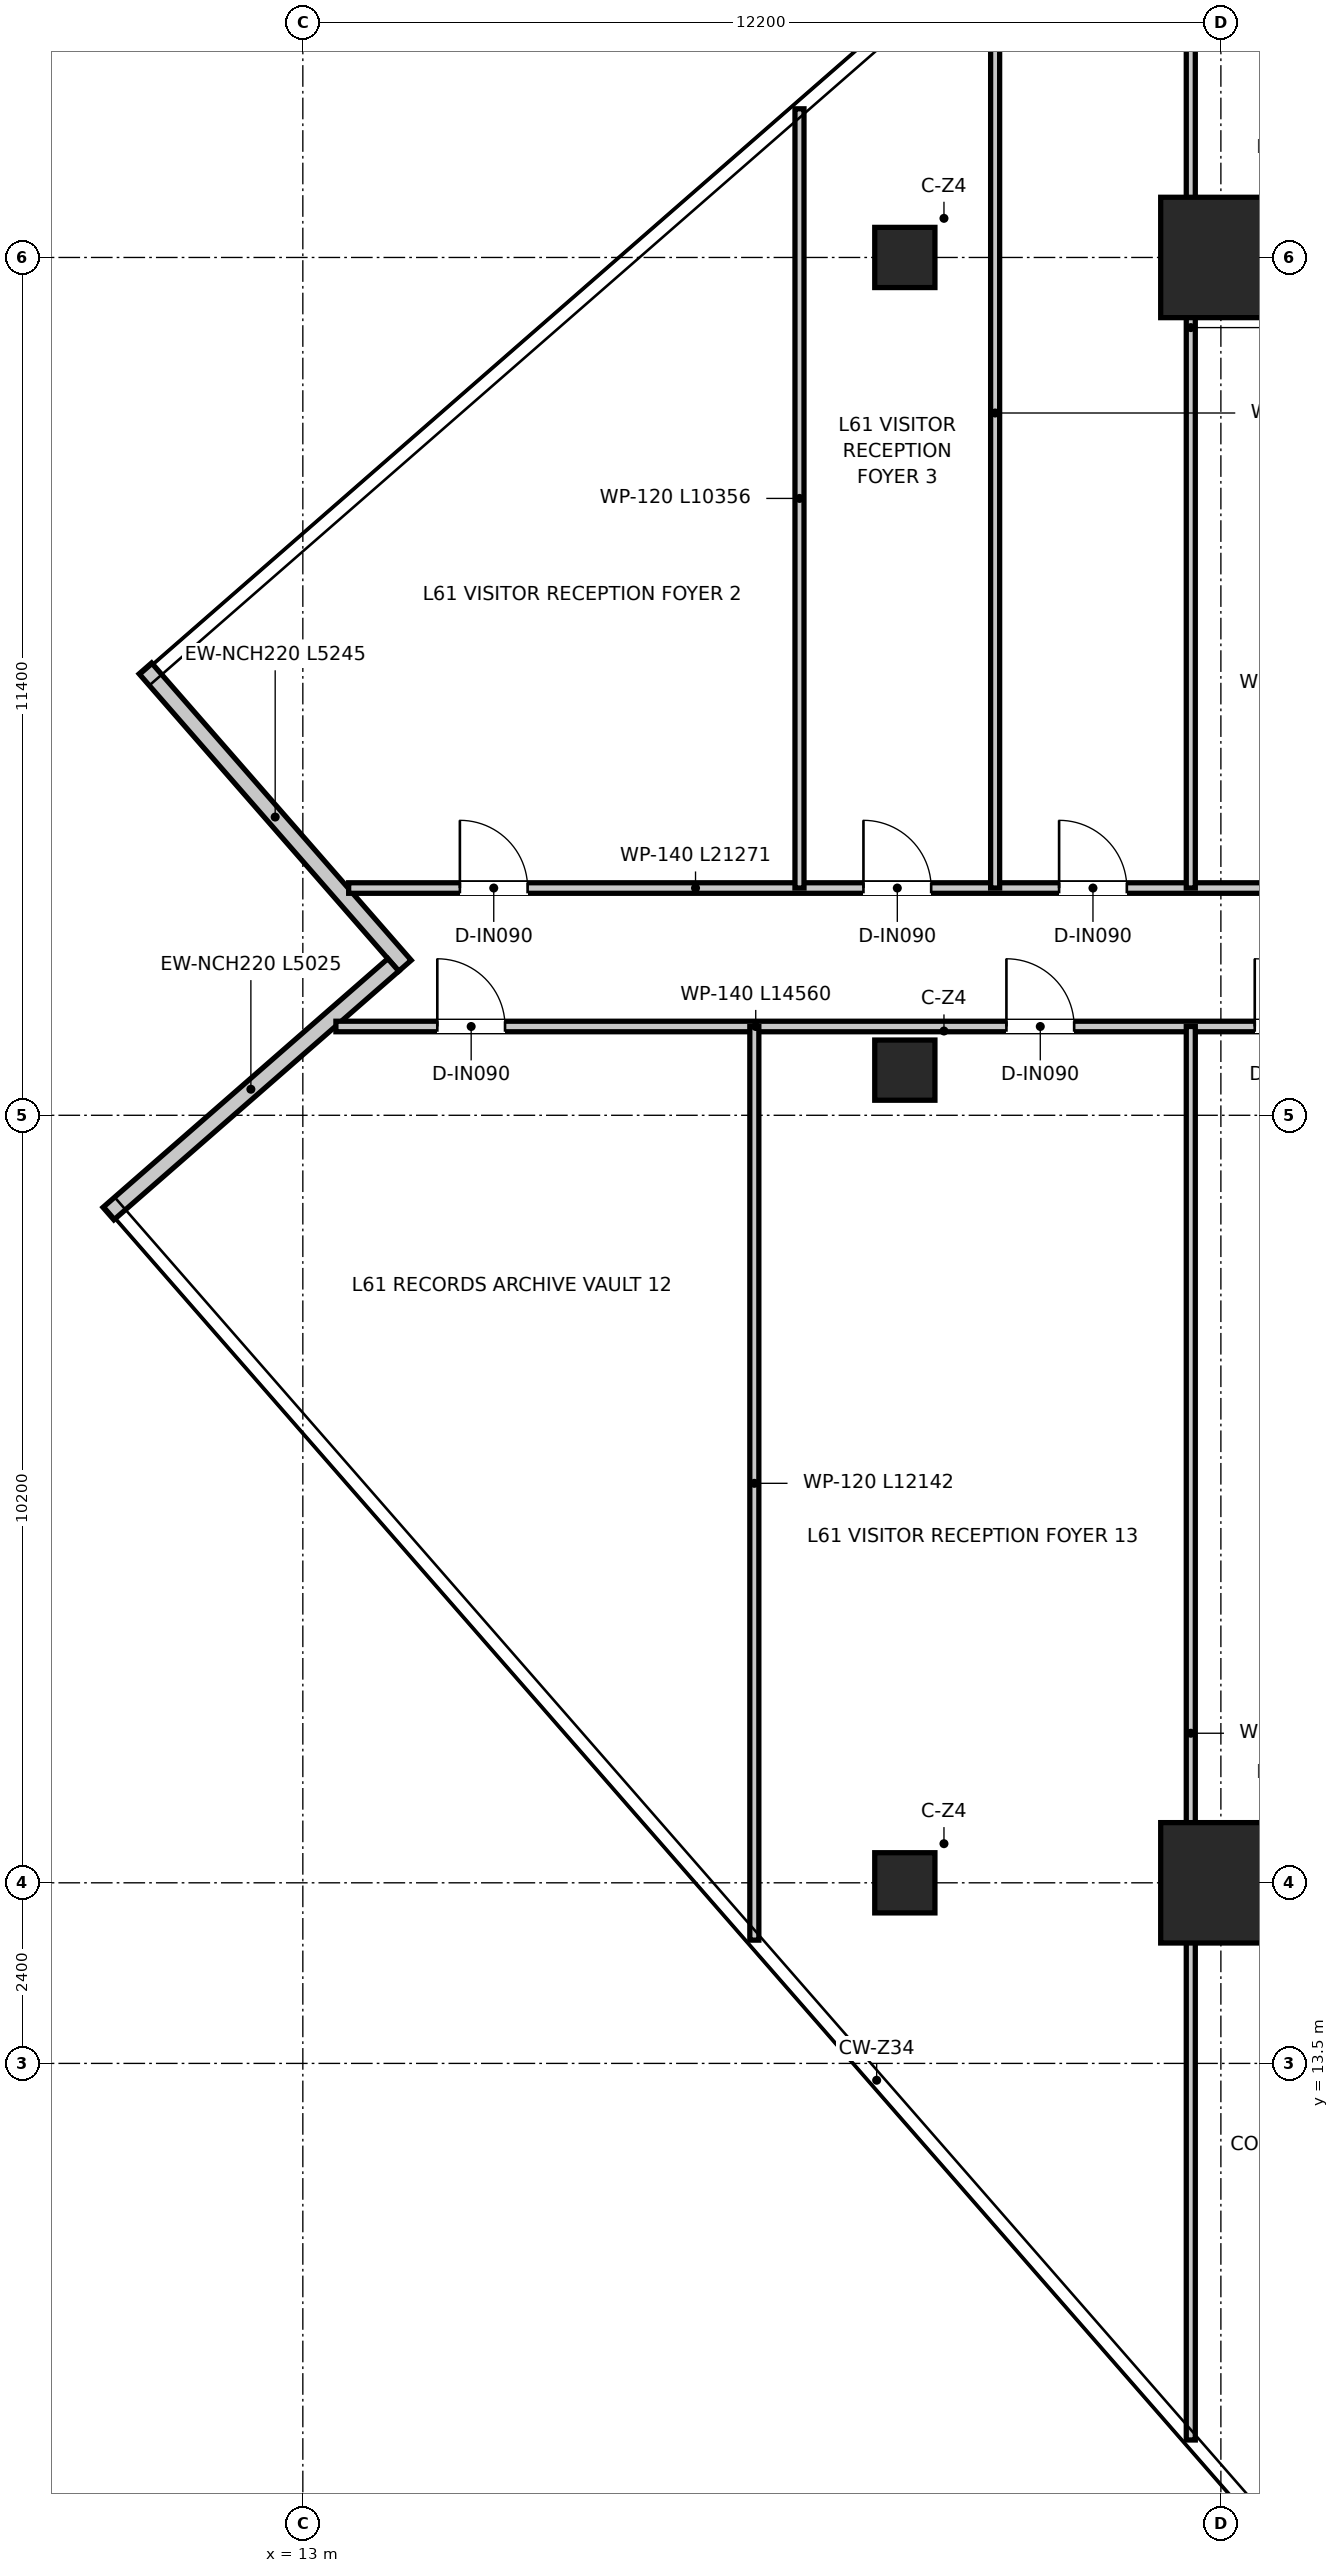
"""IFC4 building model, lengths in metres.
Left out: names, types, materials, properties, quantities, classifications, styles, units other than length and angle.
Written with IfcOpenShell. Run it as: python <this file> out.ifc"""

import sys

from ifc_helpers import new_model, si_unit, direction, frame, frame_2d, origin, origin_2d, place, context, subcontext, project, spatial, rectangle, extrude, source, transform, mapped, element, fill, save


model = new_model("IFC4")
c1 = context("Model", 3, precision=1e-05, world=origin(), true_north=direction((0.0, 1.0)))
c2 = subcontext(c1, "Body", "Model", "MODEL_VIEW")
j1 = project(units=[si_unit("LENGTHUNIT", "METRE"), si_unit("PLANEANGLEUNIT", "RADIAN")], contexts=[c1])
p1 = place(None, origin())
s1 = spatial("IfcSite", under=j1, at=p1, CompositionType="ELEMENT")
p2 = place(p1, origin())
s2 = spatial("IfcBuilding", under=s1, at=p2, CompositionType="ELEMENT")
p3 = place(p2, frame((0.0, 0.0, 250.75)))
s3 = spatial("IfcBuildingStorey", under=s2, at=p3, CompositionType="ELEMENT", Elevation=250.75)
m1 = source(origin(), c2, "Body", "SweptSolid", [
    extrude(rectangle(XDim=1.6, YDim=1.6, at=origin_2d()), origin(), (0.0, 0.0, 1.0), 3.95),
])
for number, where, z_axis, x_axis in (
    (1, (25.2, 15.9, 0.0), (0.0, 0.0, 1.0), (1.0, 0.0, 0.0)),
    (2, (25.2, 37.5, 0.0), (0.0, 0.0, 1.0), (1.0, 0.0, 0.0)),
):
    element("IfcColumn", number, at=place(p3, frame(where, z_axis=z_axis, x_axis=x_axis)), inside=s3, PredefinedType="USERDEFINED", context=c2, shape_type="MappedRepresentation", body=[
        mapped(m1, transform((0.0, 0.0, 0.0), x_axis=(1.0, 0.0, 0.0), y_axis=(0.0, 1.0, 0.0), z_axis=(0.0, 0.0, 1.0), scale=1.0)),
    ])
m2 = source(origin(), c2, "Body", "SweptSolid", [
    extrude(rectangle(XDim=0.8, YDim=0.8, at=origin_2d()), origin(), (0.0, 0.0, 1.0), 3.95),
])
for number, where, z_axis, x_axis in (
    (3, (21.0, 15.9, 0.0), (0.0, 0.0, 1.0), (1.0, 0.0, 0.0)),
    (4, (21.0, 26.7, 0.0), (0.0, 0.0, 1.0), (1.0, 0.0, 0.0)),
    (5, (21.0, 37.5, 0.0), (0.0, 0.0, 1.0), (1.0, 0.0, 0.0)),
):
    element("IfcColumn", number, at=place(p3, frame(where, z_axis=z_axis, x_axis=x_axis)), inside=s3, PredefinedType="COLUMN", context=c2, shape_type="MappedRepresentation", body=[
        mapped(m2, transform((0.0, 0.0, 0.0), x_axis=(1.0, 0.0, 0.0), y_axis=(0.0, 1.0, 0.0), z_axis=(0.0, 0.0, 1.0), scale=1.0)),
    ])
p4 = place(p3, frame((10.908, 32.039, 0.0), z_axis=(0.0, 0.0, 1.0), x_axis=(0.657710057617, -0.7532711863, 0.0)))
e6 = element("IfcWall", 6, at=p4, inside=s3, PredefinedType="ELEMENTEDWALL", context=c2, shape_type="SweptSolid", body=[
    extrude(rectangle(XDim=5.245, YDim=0.22, at=frame_2d((2.623, 0.0))), origin(), (0.0, 0.0, 1.0), 3.67),
])
p5 = place(p3, frame((14.202, 28.098, 0.0), z_axis=(0.0, 0.0, 1.0), x_axis=(-0.753274531518, -0.657706226339, 0.0)))
e7 = element("IfcWall", 7, at=p5, inside=s3, PredefinedType="ELEMENTEDWALL", context=c2, shape_type="SweptSolid", body=[
    extrude(rectangle(XDim=5.025, YDim=0.22, at=frame_2d((2.512, 0.0))), origin(), (0.0, 0.0, 1.0), 3.67),
])
p6 = place(p3, frame((13.609, 29.12, 0.0), z_axis=(0.0, 0.0, 1.0), x_axis=(1.0, 0.0, 0.0)))
e8 = element("IfcWall", 8, at=p6, inside=s3, PredefinedType="PARTITIONING", context=c2, shape_type="SweptSolid", body=[
    extrude(rectangle(XDim=21.271, YDim=0.14, at=frame_2d((10.635, 0.0))), origin(), (0.0, 0.0, 1.0), 3.03),
])
p7 = place(p6, frame((17.341, 0.0, 0.0)))
e9 = element("IfcOpeningElement", 9, at=p7, cuts=e8, PredefinedType="OPENING", context=c2, shape_type="SweptSolid", body=[
    extrude(rectangle(XDim=0.9, YDim=2.1, at=frame_2d((0.45, 1.05))), frame((0.0, 0.08, 0.0), z_axis=(0.0, -1.0, 0.0), x_axis=(1.0, 0.0, 0.0)), (0.0, 0.0, 1.0), 0.16),
])
p8 = place(p6, frame((1.478, 0.0, 0.0)))
e10 = element("IfcOpeningElement", 10, at=p8, cuts=e8, PredefinedType="OPENING", context=c2, shape_type="SweptSolid", body=[
    extrude(rectangle(XDim=0.9, YDim=2.1, at=frame_2d((0.45, 1.05))), frame((0.0, 0.08, 0.0), z_axis=(0.0, -1.0, 0.0), x_axis=(1.0, 0.0, 0.0)), (0.0, 0.0, 1.0), 0.16),
])
p9 = place(p6, frame((6.841, 0.0, 0.0)))
e11 = element("IfcOpeningElement", 11, at=p9, cuts=e8, PredefinedType="OPENING", context=c2, shape_type="SweptSolid", body=[
    extrude(rectangle(XDim=0.9, YDim=2.1, at=frame_2d((0.45, 1.05))), frame((0.0, 0.08, 0.0), z_axis=(0.0, -1.0, 0.0), x_axis=(1.0, 0.0, 0.0)), (0.0, 0.0, 1.0), 0.16),
])
p10 = place(p6, frame((9.441, 0.0, 0.0)))
e12 = element("IfcOpeningElement", 12, at=p10, cuts=e8, PredefinedType="OPENING", context=c2, shape_type="SweptSolid", body=[
    extrude(rectangle(XDim=0.9, YDim=2.1, at=frame_2d((0.45, 1.05))), frame((0.0, 0.08, 0.0), z_axis=(0.0, -1.0, 0.0), x_axis=(1.0, 0.0, 0.0)), (0.0, 0.0, 1.0), 0.16),
])
p11 = place(p6, frame((12.141, 0.0, 0.0)))
e13 = element("IfcOpeningElement", 13, at=p11, cuts=e8, PredefinedType="OPENING", context=c2, shape_type="SweptSolid", body=[
    extrude(rectangle(XDim=0.9, YDim=2.1, at=frame_2d((0.45, 1.05))), frame((0.0, 0.08, 0.0), z_axis=(0.0, -1.0, 0.0), x_axis=(1.0, 0.0, 0.0)), (0.0, 0.0, 1.0), 0.16),
])
p12 = place(p3, frame((13.439, 27.28, 0.0), z_axis=(0.0, 0.0, 1.0), x_axis=(1.0, 0.0, 0.0)))
e14 = element("IfcWall", 14, at=p12, inside=s3, PredefinedType="PARTITIONING", context=c2, shape_type="SweptSolid", body=[
    extrude(rectangle(XDim=14.561, YDim=0.14, at=frame_2d((7.28, 0.0))), origin(), (0.0, 0.0, 1.0), 3.03),
])
p13 = place(p12, frame((1.347, 0.0, 0.0)))
e15 = element("IfcOpeningElement", 15, at=p13, cuts=e14, PredefinedType="OPENING", context=c2, shape_type="SweptSolid", body=[
    extrude(rectangle(XDim=0.9, YDim=2.1, at=frame_2d((0.45, 1.05))), frame((0.0, 0.08, 0.0), z_axis=(0.0, -1.0, 0.0), x_axis=(1.0, 0.0, 0.0)), (0.0, 0.0, 1.0), 0.16),
])
p14 = place(p12, frame((8.91, 0.0, 0.0)))
e16 = element("IfcOpeningElement", 16, at=p14, cuts=e14, PredefinedType="OPENING", context=c2, shape_type="SweptSolid", body=[
    extrude(rectangle(XDim=0.9, YDim=2.1, at=frame_2d((0.45, 1.05))), frame((0.0, 0.08, 0.0), z_axis=(0.0, -1.0, 0.0), x_axis=(1.0, 0.0, 0.0)), (0.0, 0.0, 1.0), 0.16),
])
p15 = place(p12, frame((12.21, 0.0, 0.0)))
e17 = element("IfcOpeningElement", 17, at=p15, cuts=e14, PredefinedType="OPENING", context=c2, shape_type="SweptSolid", body=[
    extrude(rectangle(XDim=0.9, YDim=2.1, at=frame_2d((0.45, 1.05))), frame((0.0, 0.08, 0.0), z_axis=(0.0, -1.0, 0.0), x_axis=(1.0, 0.0, 0.0)), (0.0, 0.0, 1.0), 0.16),
])
p16 = place(p3, frame((19.6, 29.12, 0.0), z_axis=(0.0, 0.0, 1.0), x_axis=(0.0, 1.0, 0.0)))
e18 = element("IfcWall", 18, at=p16, inside=s3, PredefinedType="PARTITIONING", context=c2, shape_type="SweptSolid", body=[
    extrude(rectangle(XDim=10.355, YDim=0.12, at=frame_2d((5.178, 0.0))), origin(), (0.0, 0.0, 1.0), 3.67),
])
p17 = place(p3, frame((22.2, 29.12, 0.0), z_axis=(0.0, 0.0, 1.0), x_axis=(0.0, 1.0, 0.0)))
e19 = element("IfcWall", 19, at=p17, inside=s3, PredefinedType="PARTITIONING", context=c2, shape_type="SweptSolid", body=[
    extrude(rectangle(XDim=12.626, YDim=0.12, at=frame_2d((6.313, 0.0))), origin(), (0.0, 0.0, 1.0), 3.18),
])
p18 = place(p3, frame((24.8, 29.12, 0.0), z_axis=(0.0, 0.0, 1.0), x_axis=(0.0, 1.0, 0.0)))
e20 = element("IfcWall", 20, at=p18, inside=s3, PredefinedType="PARTITIONING", context=c2, shape_type="SweptSolid", body=[
    extrude(rectangle(XDim=14.896, YDim=0.12, at=frame_2d((7.448, 0.0))), origin(), (0.0, 0.0, 1.0), 3.18),
])
p19 = place(p3, frame((19.0, 15.138, 0.0), z_axis=(0.0, 0.0, 1.0), x_axis=(0.0, 1.0, 0.0)))
e21 = element("IfcWall", 21, at=p19, inside=s3, PredefinedType="PARTITIONING", context=c2, shape_type="SweptSolid", body=[
    extrude(rectangle(XDim=12.142, YDim=0.12, at=frame_2d((6.071, 0.0))), origin(), (0.0, 0.0, 1.0), 3.67),
])
p20 = place(p3, frame((24.8, 8.495, 0.0), z_axis=(0.0, 0.0, 1.0), x_axis=(0.0, 1.0, 0.0)))
e22 = element("IfcWall", 22, at=p20, inside=s3, PredefinedType="PARTITIONING", context=c2, shape_type="SweptSolid", body=[
    extrude(rectangle(XDim=18.785, YDim=0.12, at=frame_2d((9.392, 0.0))), origin(), (0.0, 0.0, 1.0), 3.18),
])
p21 = place(p8, origin())
e23 = element("IfcDoor", 23, at=p21, inside=s3, OperationType="SINGLE_SWING_LEFT", PredefinedType="DOOR", context=c2, shape_type="SweptSolid", body=[
    extrude(rectangle(XDim=0.9, YDim=2.1, at=frame_2d((0.45, 1.05))), frame((0.0, 0.025, 0.0), z_axis=(0.0, -1.0, 0.0), x_axis=(1.0, 0.0, 0.0)), (0.0, 0.0, 1.0), 0.05),
])
fill(e10, e23)
p22 = place(p9, origin())
e24 = element("IfcDoor", 24, at=p22, inside=s3, OperationType="SINGLE_SWING_LEFT", PredefinedType="DOOR", context=c2, shape_type="SweptSolid", body=[
    extrude(rectangle(XDim=0.9, YDim=2.1, at=frame_2d((0.45, 1.05))), frame((0.0, 0.025, 0.0), z_axis=(0.0, -1.0, 0.0), x_axis=(1.0, 0.0, 0.0)), (0.0, 0.0, 1.0), 0.05),
])
fill(e11, e24)
p23 = place(p10, origin())
e25 = element("IfcDoor", 25, at=p23, inside=s3, OperationType="SINGLE_SWING_LEFT", PredefinedType="DOOR", context=c2, shape_type="SweptSolid", body=[
    extrude(rectangle(XDim=0.9, YDim=2.1, at=frame_2d((0.45, 1.05))), frame((0.0, 0.025, 0.0), z_axis=(0.0, -1.0, 0.0), x_axis=(1.0, 0.0, 0.0)), (0.0, 0.0, 1.0), 0.05),
])
fill(e12, e25)
p24 = place(p13, origin())
e26 = element("IfcDoor", 26, at=p24, inside=s3, OperationType="SINGLE_SWING_LEFT", PredefinedType="DOOR", context=c2, shape_type="SweptSolid", body=[
    extrude(rectangle(XDim=0.9, YDim=2.1, at=frame_2d((0.45, 1.05))), frame((0.0, 0.025, 0.0), z_axis=(0.0, -1.0, 0.0), x_axis=(1.0, 0.0, 0.0)), (0.0, 0.0, 1.0), 0.05),
])
fill(e15, e26)
p25 = place(p14, origin())
e27 = element("IfcDoor", 27, at=p25, inside=s3, OperationType="SINGLE_SWING_LEFT", PredefinedType="DOOR", context=c2, shape_type="SweptSolid", body=[
    extrude(rectangle(XDim=0.9, YDim=2.1, at=frame_2d((0.45, 1.05))), frame((0.0, 0.025, 0.0), z_axis=(0.0, -1.0, 0.0), x_axis=(1.0, 0.0, 0.0)), (0.0, 0.0, 1.0), 0.05),
])
fill(e16, e27)
p26 = place(p15, origin())
e28 = element("IfcDoor", 28, at=p26, inside=s3, OperationType="SINGLE_SWING_LEFT", PredefinedType="DOOR", context=c2, shape_type="SweptSolid", body=[
    extrude(rectangle(XDim=0.9, YDim=2.1, at=frame_2d((0.45, 1.05))), frame((0.0, 0.025, 0.0), z_axis=(0.0, -1.0, 0.0), x_axis=(1.0, 0.0, 0.0)), (0.0, 0.0, 1.0), 0.05),
])
fill(e17, e28)
save(model, sys.argv[1])
